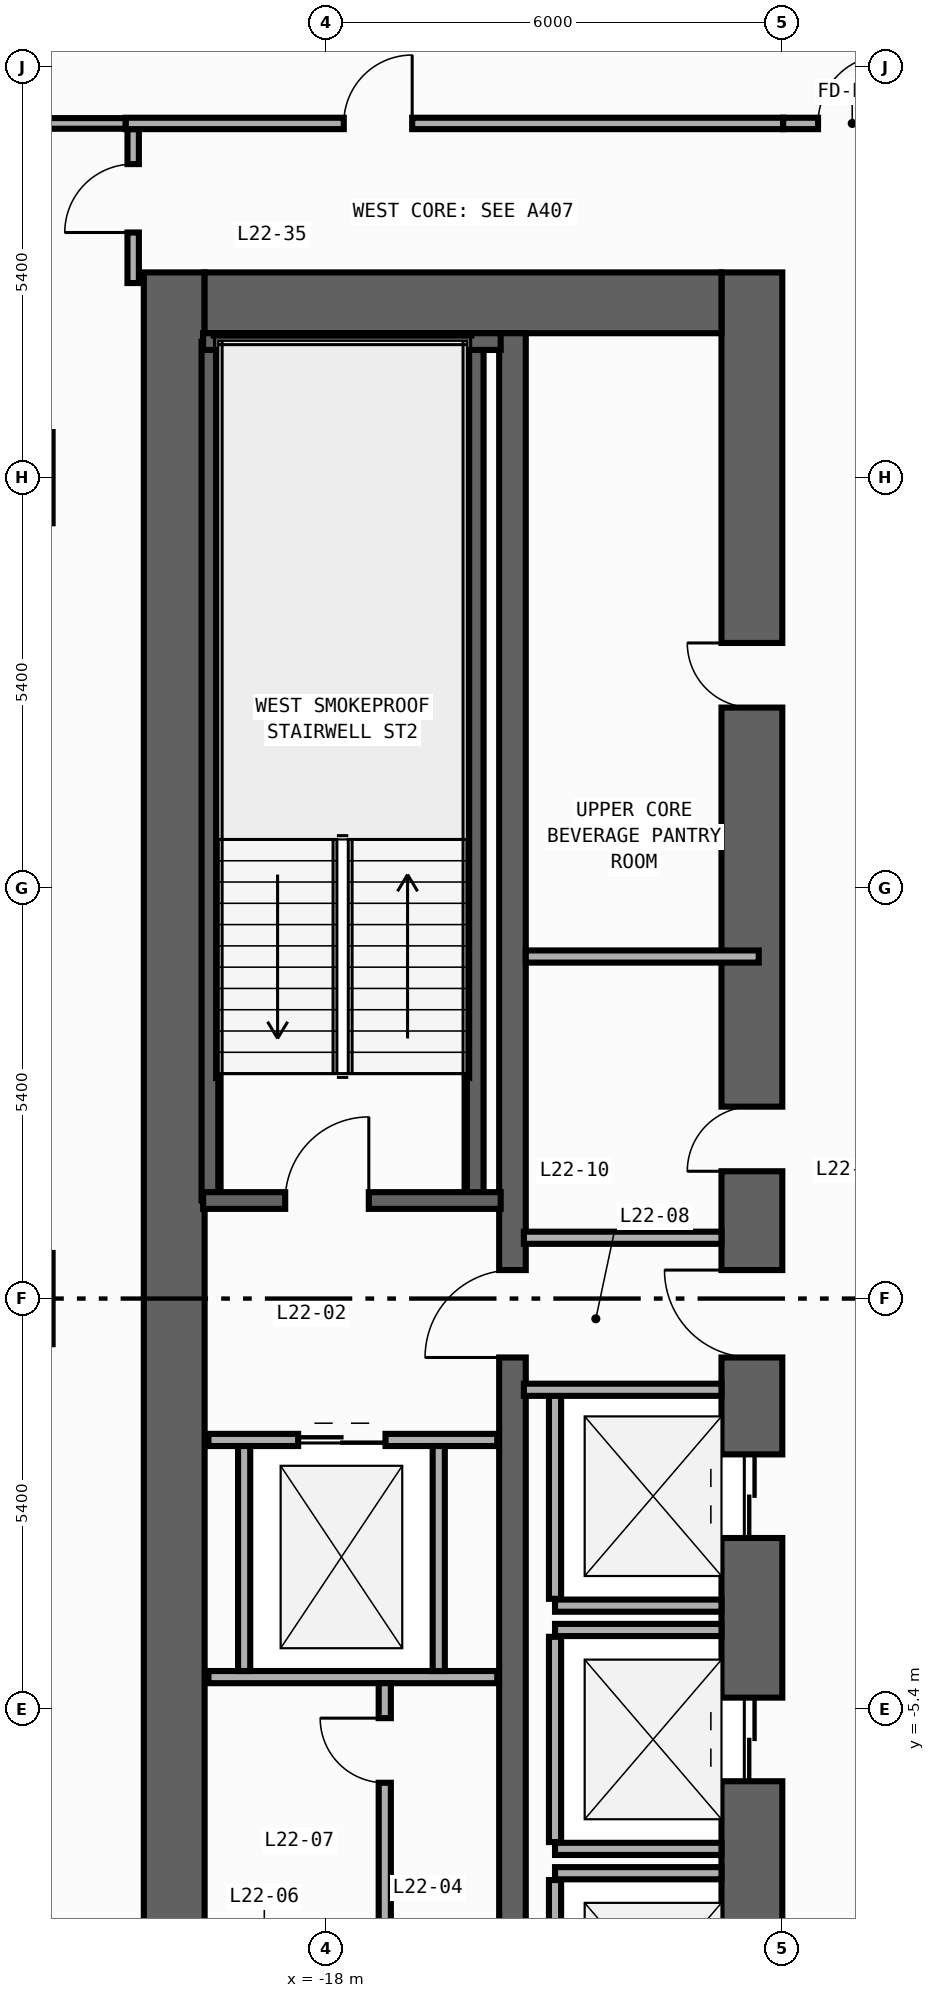
"""IFC4 building model, lengths in metres.
Left out: names, types, materials, properties, quantities, classifications, styles, units other than length and angle.
Written with IfcOpenShell. Run it as: python <this file> out.ifc"""

import sys

from ifc_helpers import new_model, si_unit, direction, frame, frame_2d, origin, origin_2d, place, context, subcontext, project, spatial, rectangle, extrude, element, fill, save


model = new_model("IFC4")
c1 = context("Model", 3, precision=1e-05, world=origin(), true_north=direction((0.0, 1.0)))
c2 = subcontext(c1, "Body", "Model", "MODEL_VIEW")
j1 = project(units=[si_unit("LENGTHUNIT", "METRE"), si_unit("PLANEANGLEUNIT", "RADIAN")], contexts=[c1])
p1 = place(None, origin())
s1 = spatial("IfcSite", under=j1, at=p1, CompositionType="ELEMENT")
p2 = place(p1, origin())
s2 = spatial("IfcBuilding", under=s1, at=p2, CompositionType="ELEMENT")
p3 = place(p2, frame((0.0, 0.0, 97.4)))
s3 = spatial("IfcBuildingStorey", under=s2, at=p3, CompositionType="ELEMENT", Elevation=97.4)
p4 = place(p3, frame((-20.0, -13.5, 0.0), z_axis=(0.0, 0.0, 1.0), x_axis=(0.0, 1.0, 0.0)))
e1 = element("IfcWall", 1, at=p4, inside=s3, PredefinedType="SHEAR", context=c2, shape_type="SweptSolid", body=[
    extrude(rectangle(XDim=27.0, YDim=0.8, at=frame_2d((13.5, 0.0))), origin(), (0.0, 0.0, 1.0), 3.94),
])
p5 = place(p3, frame((-12.4, -13.5, 0.0), z_axis=(0.0, 0.0, 1.0), x_axis=(0.0, 1.0, 0.0)))
e2 = element("IfcWall", 2, at=p5, inside=s3, PredefinedType="SHEAR", context=c2, shape_type="SweptSolid", body=[
    extrude(rectangle(XDim=27.0, YDim=0.8, at=frame_2d((13.5, 0.0))), origin(), (0.0, 0.0, 1.0), 3.94),
])
p6 = place(p5, frame((10.35, 0.0, 0.0)))
e3 = element("IfcOpeningElement", 3, at=p6, cuts=e2, PredefinedType="OPENING", context=c2, shape_type="SweptSolid", body=[
    extrude(rectangle(XDim=1.1, YDim=2.2, at=frame_2d((0.55, 1.1))), frame((0.0, 0.41, 0.0), z_axis=(0.0, -1.0, 0.0), x_axis=(1.0, 0.0, 0.0)), (0.0, 0.0, 1.0), 0.82),
])
p7 = place(p5, frame((7.15, 0.0, 0.0)))
e4 = element("IfcOpeningElement", 4, at=p7, cuts=e2, PredefinedType="OPENING", context=c2, shape_type="SweptSolid", body=[
    extrude(rectangle(XDim=1.1, YDim=2.2, at=frame_2d((0.55, 1.1))), frame((0.0, 0.41, 0.0), z_axis=(0.0, -1.0, 0.0), x_axis=(1.0, 0.0, 0.0)), (0.0, 0.0, 1.0), 0.82),
])
p8 = place(p5, frame((3.95, 0.0, 0.0)))
e5 = element("IfcOpeningElement", 5, at=p8, cuts=e2, PredefinedType="OPENING", context=c2, shape_type="SweptSolid", body=[
    extrude(rectangle(XDim=1.1, YDim=2.2, at=frame_2d((0.55, 1.1))), frame((0.0, 0.41, 0.0), z_axis=(0.0, -1.0, 0.0), x_axis=(1.0, 0.0, 0.0)), (0.0, 0.0, 1.0), 0.82),
])
p9 = place(p5, frame((15.175, 0.0, 0.0)))
e6 = element("IfcOpeningElement", 6, at=p9, cuts=e2, PredefinedType="OPENING", context=c2, shape_type="SweptSolid", body=[
    extrude(rectangle(XDim=0.85, YDim=2.1, at=frame_2d((0.425, 1.05))), frame((0.0, 0.41, 0.0), z_axis=(0.0, -1.0, 0.0), x_axis=(1.0, 0.0, 0.0)), (0.0, 0.0, 1.0), 0.82),
])
p10 = place(p5, frame((21.275, 0.0, 0.0)))
e7 = element("IfcOpeningElement", 7, at=p10, cuts=e2, PredefinedType="OPENING", context=c2, shape_type="SweptSolid", body=[
    extrude(rectangle(XDim=0.85, YDim=2.1, at=frame_2d((0.425, 1.05))), frame((0.0, 0.41, 0.0), z_axis=(0.0, -1.0, 0.0), x_axis=(1.0, 0.0, 0.0)), (0.0, 0.0, 1.0), 0.82),
])
p11 = place(p5, frame((12.725, 0.0, 0.0)))
e8 = element("IfcOpeningElement", 8, at=p11, cuts=e2, PredefinedType="OPENING", context=c2, shape_type="SweptSolid", body=[
    extrude(rectangle(XDim=1.15, YDim=2.2, at=frame_2d((0.575, 1.1))), frame((0.0, 0.41, 0.0), z_axis=(0.0, -1.0, 0.0), x_axis=(1.0, 0.0, 0.0)), (0.0, 0.0, 1.0), 0.82),
])
p12 = place(p5, frame((1.625, 0.0, 0.0)))
e9 = element("IfcOpeningElement", 9, at=p12, cuts=e2, PredefinedType="OPENING", context=c2, shape_type="SweptSolid", body=[
    extrude(rectangle(XDim=0.85, YDim=2.1, at=frame_2d((0.425, 1.05))), frame((0.0, 0.41, 0.0), z_axis=(0.0, -1.0, 0.0), x_axis=(1.0, 0.0, 0.0)), (0.0, 0.0, 1.0), 0.82),
])
p13 = place(p3, frame((-19.6, 13.1, 0.0), z_axis=(0.0, 0.0, 1.0), x_axis=(1.0, 0.0, 0.0)))
e10 = element("IfcWall", 10, at=p13, inside=s3, PredefinedType="SHEAR", context=c2, shape_type="SweptSolid", body=[
    extrude(rectangle(XDim=6.8, YDim=0.8, at=frame_2d((3.4, 0.0))), origin(), (0.0, 0.0, 1.0), 3.94),
])
p14 = place(p3, frame((-15.55, -12.7, 0.0), z_axis=(0.0, 0.0, 1.0), x_axis=(0.0, 1.0, 0.0)))
e11 = element("IfcWall", 11, at=p14, inside=s3, PredefinedType="SHEAR", context=c2, shape_type="SweptSolid", body=[
    extrude(rectangle(XDim=25.4, YDim=0.35, at=frame_2d((12.7, 0.0))), origin(), (0.0, 0.0, 1.0), 3.94),
])
p15 = place(p14, frame((11.925, 0.0, 0.0)))
e12 = element("IfcOpeningElement", 12, at=p15, cuts=e11, PredefinedType="OPENING", context=c2, shape_type="SweptSolid", body=[
    extrude(rectangle(XDim=1.15, YDim=2.2, at=frame_2d((0.575, 1.1))), frame((0.0, 0.185, 0.0), z_axis=(0.0, -1.0, 0.0), x_axis=(1.0, 0.0, 0.0)), (0.0, 0.0, 1.0), 0.37),
])
p16 = place(p14, frame((0.825, 0.0, 0.0)))
e13 = element("IfcOpeningElement", 13, at=p16, cuts=e11, PredefinedType="OPENING", context=c2, shape_type="SweptSolid", body=[
    extrude(rectangle(XDim=0.85, YDim=2.1, at=frame_2d((0.425, 1.05))), frame((0.0, 0.185, 0.0), z_axis=(0.0, -1.0, 0.0), x_axis=(1.0, 0.0, 0.0)), (0.0, 0.0, 1.0), 0.37),
])
for number, where, z_axis, x_axis in (
    (14, (-16.04, 1.29, 0.0), (0.0, 0.0, 1.0), (0.0, 1.0, 0.0)),
    (15, (-19.53, 1.29, 0.0), (0.0, 0.0, 1.0), (0.0, 1.0, 0.0)),
):
    element("IfcWall", number, at=place(p3, frame(where, z_axis=z_axis, x_axis=x_axis)), inside=s3, PredefinedType="SHEAR", context=c2, shape_type="SweptSolid", body=[
        extrude(rectangle(XDim=11.3, YDim=0.22, at=frame_2d((5.65, 0.0))), origin(), (0.0, 0.0, 1.0), 3.94),
    ])
p17 = place(p3, frame((-19.62, 12.59, 0.0), z_axis=(0.0, 0.0, 1.0), x_axis=(1.0, 0.0, 0.0)))
e16 = element("IfcWall", 16, at=p17, inside=s3, PredefinedType="SHEAR", context=c2, shape_type="SweptSolid", body=[
    extrude(rectangle(XDim=3.915, YDim=0.22, at=frame_2d((1.958, 0.0))), origin(), (0.0, 0.0, 1.0), 3.94),
])
p18 = place(p3, frame((-19.62, 1.29, 0.0), z_axis=(0.0, 0.0, 1.0), x_axis=(1.0, 0.0, 0.0)))
e17 = element("IfcWall", 17, at=p18, inside=s3, PredefinedType="SHEAR", context=c2, shape_type="SweptSolid", body=[
    extrude(rectangle(XDim=3.915, YDim=0.22, at=frame_2d((1.958, 0.0))), origin(), (0.0, 0.0, 1.0), 3.94),
])
p19 = place(p18, frame((1.08, 0.0, 0.0)))
e18 = element("IfcOpeningElement", 18, at=p19, cuts=e17, PredefinedType="OPENING", context=c2, shape_type="SweptSolid", body=[
    extrude(rectangle(XDim=1.1, YDim=2.2, at=frame_2d((0.55, 1.1))), frame((0.0, 0.12, 0.0), z_axis=(0.0, -1.0, 0.0), x_axis=(1.0, 0.0, 0.0)), (0.0, 0.0, 1.0), 0.24),
])
for number, where, z_axis, x_axis in (
    (19, (-22.2, 0.0, 0.0), (0.0, 0.0, 1.0), (1.0, 0.0, 0.0)),
    (20, (-22.2, 10.8, 0.0), (0.0, 0.0, 1.0), (1.0, 0.0, 0.0)),
):
    element("IfcColumn", number, at=place(p3, frame(where, z_axis=z_axis, x_axis=x_axis)), inside=s3, PredefinedType="COLUMN", context=c2, shape_type="SweptSolid", body=[
        extrude(rectangle(XDim=1.2, YDim=1.2, at=origin_2d()), origin(), (0.0, 0.0, 1.0), 4.2),
    ])
p20 = place(p3, frame((-14.99, -4.04, 0.0), z_axis=(0.0, 0.0, 1.0), x_axis=(1.0, 0.0, 0.0)))
e21 = element("IfcWall", 21, at=p20, inside=s3, PredefinedType="STANDARD", context=c2, shape_type="SweptSolid", body=[
    extrude(rectangle(XDim=2.19, YDim=0.16, at=frame_2d((1.095, 0.0))), origin(), (0.0, 0.0, 1.0), 3.94),
])
p21 = place(p3, frame((-14.99, -3.95, 0.0), z_axis=(0.0, 0.0, 1.0), x_axis=(0.0, 1.0, 0.0)))
e22 = element("IfcWall", 22, at=p21, inside=s3, PredefinedType="STANDARD", context=c2, shape_type="SweptSolid", body=[
    extrude(rectangle(XDim=2.7, YDim=0.16, at=frame_2d((1.35, 0.0))), origin(), (0.0, 0.0, 1.0), 3.94),
])
for number, where, z_axis, x_axis in (
    (23, (-14.99, -7.24, 0.0), (0.0, 0.0, 1.0), (1.0, 0.0, 0.0)),
    (24, (-14.99, -4.36, 0.0), (0.0, 0.0, 1.0), (1.0, 0.0, 0.0)),
):
    element("IfcWall", number, at=place(p3, frame(where, z_axis=z_axis, x_axis=x_axis)), inside=s3, PredefinedType="STANDARD", context=c2, shape_type="SweptSolid", body=[
        extrude(rectangle(XDim=2.19, YDim=0.16, at=frame_2d((1.095, 0.0))), origin(), (0.0, 0.0, 1.0), 3.94),
    ])
p22 = place(p3, frame((-14.99, -7.15, 0.0), z_axis=(0.0, 0.0, 1.0), x_axis=(0.0, 1.0, 0.0)))
e25 = element("IfcWall", 25, at=p22, inside=s3, PredefinedType="STANDARD", context=c2, shape_type="SweptSolid", body=[
    extrude(rectangle(XDim=2.7, YDim=0.16, at=frame_2d((1.35, 0.0))), origin(), (0.0, 0.0, 1.0), 3.94),
])
p23 = place(p3, frame((-14.99, -7.56, 0.0), z_axis=(0.0, 0.0, 1.0), x_axis=(1.0, 0.0, 0.0)))
e26 = element("IfcWall", 26, at=p23, inside=s3, PredefinedType="STANDARD", context=c2, shape_type="SweptSolid", body=[
    extrude(rectangle(XDim=2.19, YDim=0.16, at=frame_2d((1.095, 0.0))), origin(), (0.0, 0.0, 1.0), 3.94),
])
p24 = place(p3, frame((-14.99, -10.35, 0.0), z_axis=(0.0, 0.0, 1.0), x_axis=(0.0, 1.0, 0.0)))
e27 = element("IfcWall", 27, at=p24, inside=s3, PredefinedType="STANDARD", context=c2, shape_type="SweptSolid", body=[
    extrude(rectangle(XDim=2.7, YDim=0.16, at=frame_2d((1.35, 0.0))), origin(), (0.0, 0.0, 1.0), 3.94),
])
p25 = place(p3, frame((-19.55, -1.86, 0.0), z_axis=(0.0, 0.0, 1.0), x_axis=(1.0, 0.0, 0.0)))
e28 = element("IfcWall", 28, at=p25, inside=s3, PredefinedType="STANDARD", context=c2, shape_type="SweptSolid", body=[
    extrude(rectangle(XDim=3.8, YDim=0.16, at=frame_2d((1.9, 0.0))), origin(), (0.0, 0.0, 1.0), 3.94),
])
p26 = place(p25, frame((1.18, 0.0, 0.0)))
e29 = element("IfcOpeningElement", 29, at=p26, cuts=e28, PredefinedType="OPENING", context=c2, shape_type="SweptSolid", body=[
    extrude(rectangle(XDim=1.15, YDim=2.2, at=frame_2d((0.575, 1.1))), frame((0.0, 0.09, 0.0), z_axis=(0.0, -1.0, 0.0), x_axis=(1.0, 0.0, 0.0)), (0.0, 0.0, 1.0), 0.18),
])
p27 = place(p3, frame((-19.55, -4.98, 0.0), z_axis=(0.0, 0.0, 1.0), x_axis=(1.0, 0.0, 0.0)))
e30 = element("IfcWall", 30, at=p27, inside=s3, PredefinedType="STANDARD", context=c2, shape_type="SweptSolid", body=[
    extrude(rectangle(XDim=3.8, YDim=0.16, at=frame_2d((1.9, 0.0))), origin(), (0.0, 0.0, 1.0), 3.94),
])
for number, where, z_axis, x_axis in (
    (31, (-19.08, -4.9, 0.0), (0.0, 0.0, 1.0), (0.0, 1.0, 0.0)),
    (32, (-16.52, -4.9, 0.0), (0.0, 0.0, 1.0), (0.0, 1.0, 0.0)),
):
    element("IfcWall", number, at=place(p3, frame(where, z_axis=z_axis, x_axis=x_axis)), inside=s3, PredefinedType="STANDARD", context=c2, shape_type="SweptSolid", body=[
        extrude(rectangle(XDim=2.96, YDim=0.16, at=frame_2d((1.48, 0.0))), origin(), (0.0, 0.0, 1.0), 3.94),
    ])
for number, where, z_axis, x_axis in (
    (33, (-15.4, 0.8, 0.0), (0.0, 0.0, 1.0), (1.0, 0.0, 0.0)),
    (34, (-15.4, -1.2, 0.0), (0.0, 0.0, 1.0), (1.0, 0.0, 0.0)),
):
    element("IfcWall", number, at=place(p3, frame(where, z_axis=z_axis, x_axis=x_axis)), inside=s3, PredefinedType="STANDARD", context=c2, shape_type="SweptSolid", body=[
        extrude(rectangle(XDim=2.6, YDim=0.16, at=frame_2d((1.3, 0.0))), origin(), (0.0, 0.0, 1.0), 3.94),
    ])
p28 = place(p3, frame((-17.23, -8.27, 0.0), z_axis=(0.0, 0.0, 1.0), x_axis=(0.0, 1.0, 0.0)))
e35 = element("IfcWall", 35, at=p28, inside=s3, PredefinedType="PARTITIONING", context=c2, shape_type="SweptSolid", body=[
    extrude(rectangle(XDim=3.21, YDim=0.16, at=frame_2d((1.605, 0.0))), origin(), (0.0, 0.0, 1.0), 3.94),
])
p29 = place(p28, frame((1.9, 0.0, 0.0)))
e36 = element("IfcOpeningElement", 36, at=p29, cuts=e35, PredefinedType="OPENING", context=c2, shape_type="SweptSolid", body=[
    extrude(rectangle(XDim=0.85, YDim=2.1, at=frame_2d((0.425, 1.05))), frame((0.0, 0.09, 0.0), z_axis=(0.0, -1.0, 0.0), x_axis=(1.0, 0.0, 0.0)), (0.0, 0.0, 1.0), 0.18),
])
p30 = place(p3, frame((-15.375, 4.5, 0.0), z_axis=(0.0, 0.0, 1.0), x_axis=(1.0, 0.0, 0.0)))
e37 = element("IfcWall", 37, at=p30, inside=s3, PredefinedType="PARTITIONING", context=c2, shape_type="SweptSolid", body=[
    extrude(rectangle(XDim=3.065, YDim=0.16, at=frame_2d((1.532, 0.0))), origin(), (0.0, 0.0, 1.0), 3.94),
])
p31 = place(p3, frame((-11.99, 15.46, 0.0), z_axis=(0.0, 0.0, 1.0), x_axis=(1.0, 0.0, 0.0)))
e38 = element("IfcWall", 38, at=p31, inside=s3, PredefinedType="PARTITIONING", context=c2, shape_type="SweptSolid", body=[
    extrude(rectangle(XDim=1.98, YDim=0.15, at=frame_2d((0.99, 0.0))), origin(), (0.0, 0.0, 1.0), 3.94),
])
p32 = place(p31, frame((0.46, 0.0, 0.0)))
e39 = element("IfcOpeningElement", 39, at=p32, cuts=e38, PredefinedType="OPENING", context=c2, shape_type="SweptSolid", body=[
    extrude(rectangle(XDim=0.9, YDim=2.15, at=frame_2d((0.45, 1.075))), frame((0.0, 0.085, 0.0), z_axis=(0.0, -1.0, 0.0), x_axis=(1.0, 0.0, 0.0)), (0.0, 0.0, 1.0), 0.17),
])
p33 = place(p3, frame((-20.54, 13.36, 0.0), z_axis=(0.0, 0.0, 1.0), x_axis=(0.0, 1.0, 0.0)))
e40 = element("IfcWall", 40, at=p33, inside=s3, PredefinedType="PARTITIONING", context=c2, shape_type="SweptSolid", body=[
    extrude(rectangle(XDim=2.025, YDim=0.15, at=frame_2d((1.012, 0.0))), origin(), (0.0, 0.0, 1.0), 3.94),
])
p34 = place(p33, frame((0.665, 0.0, 0.0)))
e41 = element("IfcOpeningElement", 41, at=p34, cuts=e40, PredefinedType="OPENING", context=c2, shape_type="SweptSolid", body=[
    extrude(rectangle(XDim=0.9, YDim=2.15, at=frame_2d((0.45, 1.075))), frame((0.0, 0.085, 0.0), z_axis=(0.0, -1.0, 0.0), x_axis=(1.0, 0.0, 0.0)), (0.0, 0.0, 1.0), 0.17),
])
p35 = place(p3, frame((-20.64, 15.46, 0.0), z_axis=(0.0, 0.0, 1.0), x_axis=(1.0, 0.0, 0.0)))
e42 = element("IfcWall", 42, at=p35, inside=s3, PredefinedType="PARTITIONING", context=c2, shape_type="SweptSolid", body=[
    extrude(rectangle(XDim=8.65, YDim=0.15, at=frame_2d((4.325, 0.0))), origin(), (0.0, 0.0, 1.0), 3.94),
])
p36 = place(p35, frame((2.871, 0.0, 0.0)))
e43 = element("IfcOpeningElement", 43, at=p36, cuts=e42, PredefinedType="OPENING", context=c2, shape_type="SweptSolid", body=[
    extrude(rectangle(XDim=0.9, YDim=2.15, at=frame_2d((0.45, 1.075))), frame((0.0, 0.085, 0.0), z_axis=(0.0, -1.0, 0.0), x_axis=(1.0, 0.0, 0.0)), (0.0, 0.0, 1.0), 0.17),
])
p37 = place(p3, frame((-23.455, 15.46, 0.0), z_axis=(0.0, 0.0, 1.0), x_axis=(1.0, 0.0, 0.0)))
e44 = element("IfcWall", 44, at=p37, inside=s3, PredefinedType="PARTITIONING", context=c2, shape_type="SweptSolid", body=[
    extrude(rectangle(XDim=2.815, YDim=0.14, at=frame_2d((1.408, 0.0))), origin(), (0.0, 0.0, 1.0), 3.94),
])
p38 = place(p19, origin())
e45 = element("IfcDoor", 45, at=p38, inside=s3, OperationType="SINGLE_SWING_RIGHT", PredefinedType="DOOR", context=c2, shape_type="SweptSolid", body=[
    extrude(rectangle(XDim=1.1, YDim=2.2, at=frame_2d((0.55, 1.1))), frame((0.0, 0.025, 0.0), z_axis=(0.0, -1.0, 0.0), x_axis=(1.0, 0.0, 0.0)), (0.0, 0.0, 1.0), 0.05),
])
fill(e18, e45)
p39 = place(p6, origin())
e46 = element("IfcDoor", 46, at=p39, inside=s3, OperationType="DOUBLE_DOOR_SLIDING", PredefinedType="DOOR", context=c2, shape_type="SweptSolid", body=[
    extrude(rectangle(XDim=1.1, YDim=2.2, at=frame_2d((0.55, 1.1))), frame((0.0, 0.025, 0.0), z_axis=(0.0, -1.0, 0.0), x_axis=(1.0, 0.0, 0.0)), (0.0, 0.0, 1.0), 0.05),
])
fill(e3, e46)
p40 = place(p7, origin())
e47 = element("IfcDoor", 47, at=p40, inside=s3, OperationType="DOUBLE_DOOR_SLIDING", PredefinedType="DOOR", context=c2, shape_type="SweptSolid", body=[
    extrude(rectangle(XDim=1.1, YDim=2.2, at=frame_2d((0.55, 1.1))), frame((0.0, 0.025, 0.0), z_axis=(0.0, -1.0, 0.0), x_axis=(1.0, 0.0, 0.0)), (0.0, 0.0, 1.0), 0.05),
])
fill(e4, e47)
p41 = place(p9, origin())
e48 = element("IfcDoor", 48, at=p41, inside=s3, OperationType="SINGLE_SWING_LEFT", PredefinedType="DOOR", context=c2, shape_type="SweptSolid", body=[
    extrude(rectangle(XDim=0.85, YDim=2.1, at=frame_2d((0.425, 1.05))), frame((0.0, 0.025, 0.0), z_axis=(0.0, -1.0, 0.0), x_axis=(1.0, 0.0, 0.0)), (0.0, 0.0, 1.0), 0.05),
])
fill(e6, e48)
p42 = place(p10, origin())
e49 = element("IfcDoor", 49, at=p42, inside=s3, OperationType="SINGLE_SWING_RIGHT", PredefinedType="DOOR", context=c2, shape_type="SweptSolid", body=[
    extrude(rectangle(XDim=0.85, YDim=2.1, at=frame_2d((0.425, 1.05))), frame((0.0, 0.025, 0.0), z_axis=(0.0, -1.0, 0.0), x_axis=(1.0, 0.0, 0.0)), (0.0, 0.0, 1.0), 0.05),
])
fill(e7, e49)
p43 = place(p11, origin())
e50 = element("IfcDoor", 50, at=p43, inside=s3, OperationType="SINGLE_SWING_RIGHT", PredefinedType="DOOR", context=c2, shape_type="SweptSolid", body=[
    extrude(rectangle(XDim=1.15, YDim=2.2, at=frame_2d((0.575, 1.1))), frame((0.0, 0.025, 0.0), z_axis=(0.0, -1.0, 0.0), x_axis=(1.0, 0.0, 0.0)), (0.0, 0.0, 1.0), 0.05),
])
fill(e8, e50)
p44 = place(p15, origin())
e51 = element("IfcDoor", 51, at=p44, inside=s3, OperationType="SINGLE_SWING_LEFT", PredefinedType="DOOR", context=c2, shape_type="SweptSolid", body=[
    extrude(rectangle(XDim=1.15, YDim=2.2, at=frame_2d((0.575, 1.1))), frame((0.0, 0.025, 0.0), z_axis=(0.0, -1.0, 0.0), x_axis=(1.0, 0.0, 0.0)), (0.0, 0.0, 1.0), 0.05),
])
fill(e12, e51)
p45 = place(p26, origin())
e52 = element("IfcDoor", 52, at=p45, inside=s3, OperationType="DOUBLE_DOOR_SLIDING", PredefinedType="DOOR", context=c2, shape_type="SweptSolid", body=[
    extrude(rectangle(XDim=1.15, YDim=2.2, at=frame_2d((0.575, 1.1))), frame((0.0, 0.025, 0.0), z_axis=(0.0, -1.0, 0.0), x_axis=(1.0, 0.0, 0.0)), (0.0, 0.0, 1.0), 0.05),
])
fill(e29, e52)
p46 = place(p29, origin())
e53 = element("IfcDoor", 53, at=p46, inside=s3, OperationType="SINGLE_SWING_RIGHT", PredefinedType="DOOR", context=c2, shape_type="SweptSolid", body=[
    extrude(rectangle(XDim=0.85, YDim=2.1, at=frame_2d((0.425, 1.05))), frame((0.0, 0.025, 0.0), z_axis=(0.0, -1.0, 0.0), x_axis=(1.0, 0.0, 0.0)), (0.0, 0.0, 1.0), 0.05),
])
fill(e36, e53)
p47 = place(p32, origin())
e54 = element("IfcDoor", 54, at=p47, inside=s3, OperationType="SINGLE_SWING_RIGHT", PredefinedType="DOOR", context=c2, shape_type="SweptSolid", body=[
    extrude(rectangle(XDim=0.9, YDim=2.15, at=frame_2d((0.45, 1.075))), frame((0.0, 0.025, 0.0), z_axis=(0.0, -1.0, 0.0), x_axis=(1.0, 0.0, 0.0)), (0.0, 0.0, 1.0), 0.05),
])
fill(e39, e54)
p48 = place(p34, origin())
e55 = element("IfcDoor", 55, at=p48, inside=s3, OperationType="SINGLE_SWING_LEFT", PredefinedType="DOOR", context=c2, shape_type="SweptSolid", body=[
    extrude(rectangle(XDim=0.9, YDim=2.15, at=frame_2d((0.45, 1.075))), frame((0.0, 0.025, 0.0), z_axis=(0.0, -1.0, 0.0), x_axis=(1.0, 0.0, 0.0)), (0.0, 0.0, 1.0), 0.05),
])
fill(e41, e55)
p49 = place(p36, origin())
e56 = element("IfcDoor", 56, at=p49, inside=s3, OperationType="SINGLE_SWING_RIGHT", PredefinedType="DOOR", context=c2, shape_type="SweptSolid", body=[
    extrude(rectangle(XDim=0.9, YDim=2.15, at=frame_2d((0.45, 1.075))), frame((0.0, 0.025, 0.0), z_axis=(0.0, -1.0, 0.0), x_axis=(1.0, 0.0, 0.0)), (0.0, 0.0, 1.0), 0.05),
])
fill(e43, e56)
save(model, sys.argv[1])
